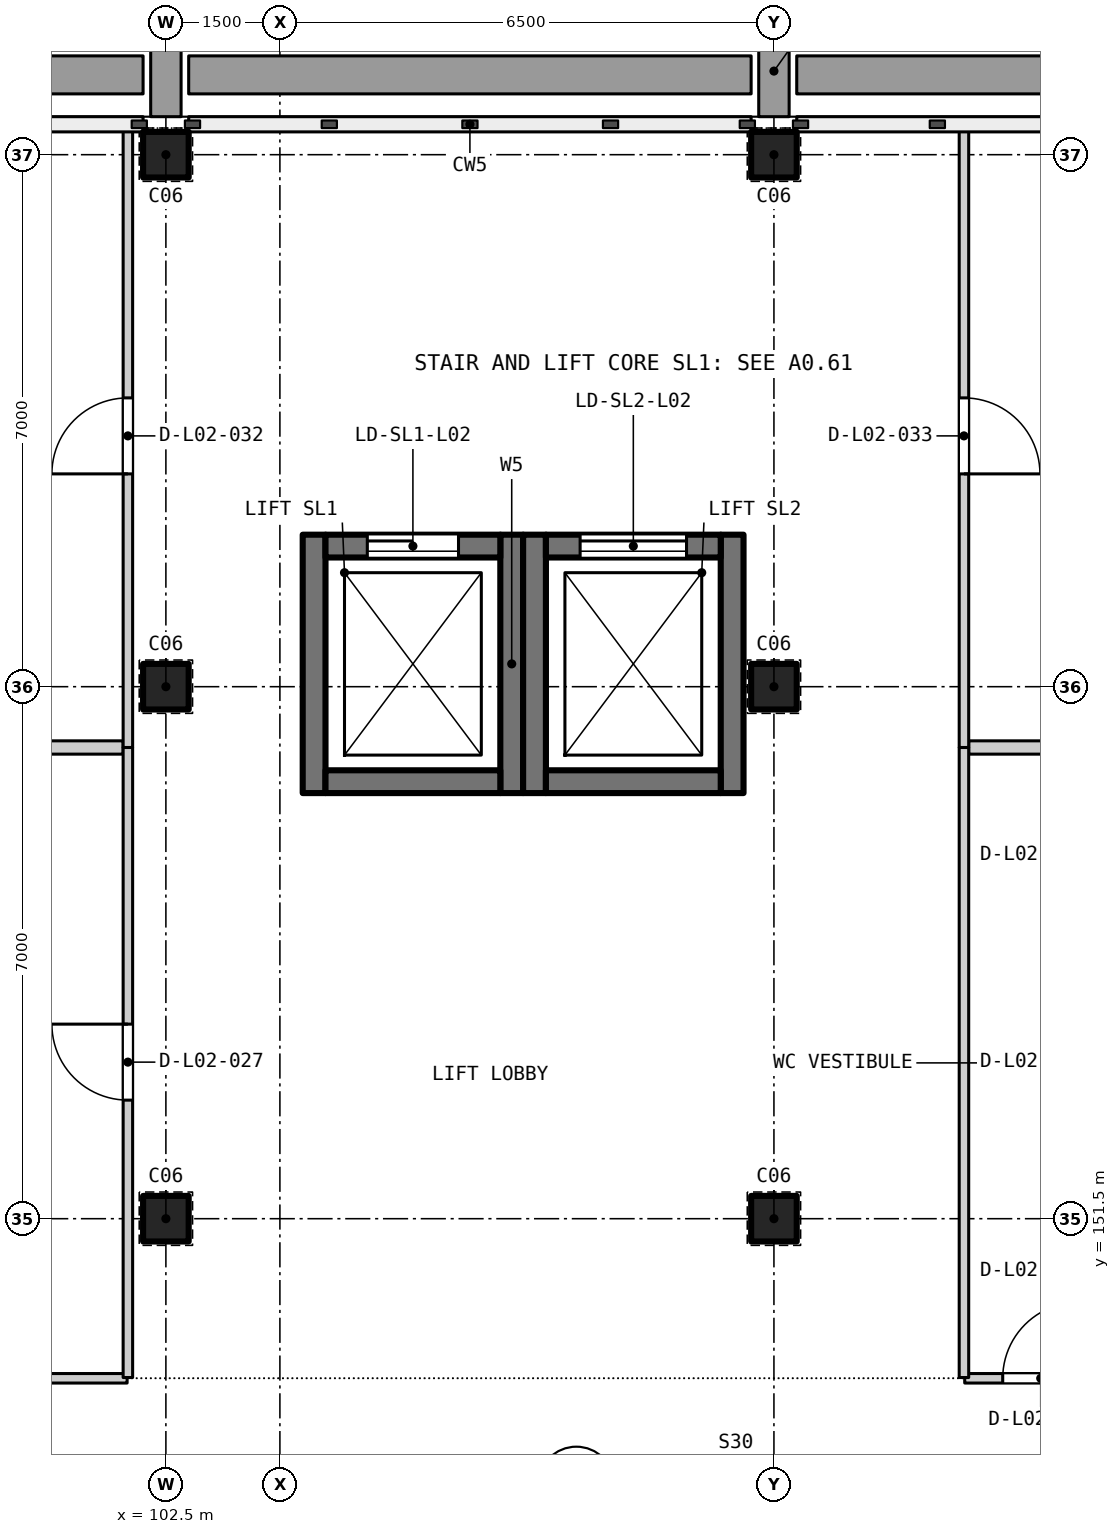
"""IFC4 building model, lengths in metres.
Left out: names, types, materials, properties, quantities, classifications, styles, units other than length and angle.
Written with IfcOpenShell. Run it as: python <this file> out.ifc"""

import sys

from ifc_helpers import new_model, si_unit, direction, frame, frame_2d, origin, origin_2d, place, context, subcontext, project, spatial, rectangle, extrude, element, fill, save


model = new_model("IFC4")
c1 = context("Model", 3, precision=1e-05, world=origin(), true_north=direction((0.0, 1.0)))
c2 = subcontext(c1, "Body", "Model", "MODEL_VIEW")
j1 = project(units=[si_unit("LENGTHUNIT", "METRE"), si_unit("PLANEANGLEUNIT", "RADIAN")], contexts=[c1])
p1 = place(None, origin())
s1 = spatial("IfcSite", under=j1, at=p1, CompositionType="ELEMENT")
p2 = place(p1, origin())
s2 = spatial("IfcBuilding", under=s1, at=p2, CompositionType="ELEMENT")
p3 = place(p2, frame((0.0, 0.0, 10.2)))
s3 = spatial("IfcBuildingStorey", under=s2, at=p3, CompositionType="ELEMENT", Elevation=10.2)
for number, where, z_axis, x_axis in (
    (1, (102.5, 151.5, 0.0), (0.0, 0.0, 1.0), (1.0, 0.0, 0.0)),
    (2, (102.5, 158.5, 0.0), (0.0, 0.0, 1.0), (1.0, 0.0, 0.0)),
    (3, (102.5, 165.5, 0.0), (0.0, 0.0, 1.0), (1.0, 0.0, 0.0)),
    (4, (110.5, 151.5, 0.0), (0.0, 0.0, 1.0), (1.0, 0.0, 0.0)),
    (5, (110.5, 158.5, 0.0), (0.0, 0.0, 1.0), (1.0, 0.0, 0.0)),
    (6, (110.5, 165.5, 0.0), (0.0, 0.0, 1.0), (1.0, 0.0, 0.0)),
):
    element("IfcColumn", number, at=place(p3, frame(where, z_axis=z_axis, x_axis=x_axis)), inside=s3, PredefinedType="COLUMN", context=c2, shape_type="SweptSolid", body=[
        extrude(rectangle(XDim=0.6, YDim=0.6, at=origin_2d()), origin(), (0.0, 0.0, 1.0), 4.2),
    ])
for number, where, z_axis, x_axis in (
    (7, (104.45, 157.1, 0.0), (0.0, 0.0, 1.0), (0.0, 1.0, 0.0)),
    (8, (107.05, 157.1, 0.0), (0.0, 0.0, 1.0), (0.0, 1.0, 0.0)),
):
    element("IfcWall", number, at=place(p3, frame(where, z_axis=z_axis, x_axis=x_axis)), inside=s3, PredefinedType="SHEAR", context=c2, shape_type="SweptSolid", body=[
        extrude(rectangle(XDim=3.4, YDim=0.3, at=frame_2d((1.7, 0.0))), origin(), (0.0, 0.0, 1.0), 4.2),
    ])
p4 = place(p3, frame((104.6, 157.25, 0.0), z_axis=(0.0, 0.0, 1.0), x_axis=(1.0, 0.0, 0.0)))
e9 = element("IfcWall", 9, at=p4, inside=s3, PredefinedType="SHEAR", context=c2, shape_type="SweptSolid", body=[
    extrude(rectangle(XDim=2.3, YDim=0.3, at=frame_2d((1.15, 0.0))), origin(), (0.0, 0.0, 1.0), 4.2),
])
p5 = place(p3, frame((104.6, 160.35, 0.0), z_axis=(0.0, 0.0, 1.0), x_axis=(1.0, 0.0, 0.0)))
e10 = element("IfcWall", 10, at=p5, inside=s3, PredefinedType="SHEAR", context=c2, shape_type="SweptSolid", body=[
    extrude(rectangle(XDim=2.3, YDim=0.3, at=frame_2d((1.15, 0.0))), origin(), (0.0, 0.0, 1.0), 4.2),
])
p6 = place(p5, frame((0.55, 0.0, 0.0)))
e11 = element("IfcOpeningElement", 11, at=p6, cuts=e10, PredefinedType="OPENING", context=c2, shape_type="SweptSolid", body=[
    extrude(rectangle(XDim=1.2, YDim=2.1, at=frame_2d((0.6, 1.05))), frame((0.0, 0.16, 0.0), z_axis=(0.0, -1.0, 0.0), x_axis=(1.0, 0.0, 0.0)), (0.0, 0.0, 1.0), 0.32),
])
for number, where, z_axis, x_axis in (
    (12, (107.35, 157.1, 0.0), (0.0, 0.0, 1.0), (0.0, 1.0, 0.0)),
    (13, (109.95, 157.1, 0.0), (0.0, 0.0, 1.0), (0.0, 1.0, 0.0)),
):
    element("IfcWall", number, at=place(p3, frame(where, z_axis=z_axis, x_axis=x_axis)), inside=s3, PredefinedType="SHEAR", context=c2, shape_type="SweptSolid", body=[
        extrude(rectangle(XDim=3.4, YDim=0.3, at=frame_2d((1.7, 0.0))), origin(), (0.0, 0.0, 1.0), 4.2),
    ])
p7 = place(p3, frame((107.5, 157.25, 0.0), z_axis=(0.0, 0.0, 1.0), x_axis=(1.0, 0.0, 0.0)))
e14 = element("IfcWall", 14, at=p7, inside=s3, PredefinedType="SHEAR", context=c2, shape_type="SweptSolid", body=[
    extrude(rectangle(XDim=2.3, YDim=0.3, at=frame_2d((1.15, 0.0))), origin(), (0.0, 0.0, 1.0), 4.2),
])
p8 = place(p3, frame((107.5, 160.35, 0.0), z_axis=(0.0, 0.0, 1.0), x_axis=(1.0, 0.0, 0.0)))
e15 = element("IfcWall", 15, at=p8, inside=s3, PredefinedType="SHEAR", context=c2, shape_type="SweptSolid", body=[
    extrude(rectangle(XDim=2.3, YDim=0.3, at=frame_2d((1.15, 0.0))), origin(), (0.0, 0.0, 1.0), 4.2),
])
p9 = place(p8, frame((0.45, 0.0, 0.0)))
e16 = element("IfcOpeningElement", 16, at=p9, cuts=e15, PredefinedType="OPENING", context=c2, shape_type="SweptSolid", body=[
    extrude(rectangle(XDim=1.4, YDim=2.1, at=frame_2d((0.7, 1.05))), frame((0.0, 0.16, 0.0), z_axis=(0.0, -1.0, 0.0), x_axis=(1.0, 0.0, 0.0)), (0.0, 0.0, 1.0), 0.32),
])
p10 = place(p3, frame((89.61, 149.4, 0.0), z_axis=(0.0, 0.0, 1.0), x_axis=(1.0, 0.0, 0.0)))
e17 = element("IfcWall", 17, at=p10, inside=s3, PredefinedType="PARTITIONING", context=c2, shape_type="SweptSolid", body=[
    extrude(rectangle(XDim=12.38, YDim=0.125, at=frame_2d((6.19, 0.0))), origin(), (0.0, 0.0, 1.0), 3.9),
])
p11 = place(p10, frame((5.7, 0.0, 0.0)))
e18 = element("IfcOpeningElement", 18, at=p11, cuts=e17, PredefinedType="OPENING", context=c2, shape_type="SweptSolid", body=[
    extrude(rectangle(XDim=1.0, YDim=2.1, at=frame_2d((0.5, 1.05))), frame((0.0, 0.073, 0.0), z_axis=(0.0, -1.0, 0.0), x_axis=(1.0, 0.0, 0.0)), (0.0, 0.0, 1.0), 0.145),
])
p12 = place(p3, frame((113.01, 149.4, 0.0), z_axis=(0.0, 0.0, 1.0), x_axis=(1.0, 0.0, 0.0)))
e19 = element("IfcWall", 19, at=p12, inside=s3, PredefinedType="PARTITIONING", context=c2, shape_type="SweptSolid", body=[
    extrude(rectangle(XDim=1.99, YDim=0.125, at=frame_2d((0.995, 0.0))), origin(), (0.0, 0.0, 1.0), 3.9),
])
p13 = place(p12, frame((0.5, 0.0, 0.0)))
e20 = element("IfcOpeningElement", 20, at=p13, cuts=e19, PredefinedType="OPENING", context=c2, shape_type="SweptSolid", body=[
    extrude(rectangle(XDim=1.0, YDim=2.1, at=frame_2d((0.5, 1.05))), frame((0.0, 0.073, 0.0), z_axis=(0.0, -1.0, 0.0), x_axis=(1.0, 0.0, 0.0)), (0.0, 0.0, 1.0), 0.145),
])
p14 = place(p3, frame((89.663, 157.7, 0.0), z_axis=(0.0, 0.0, 1.0), x_axis=(1.0, 0.0, 0.0)))
e21 = element("IfcWall", 21, at=p14, inside=s3, PredefinedType="PARTITIONING", context=c2, shape_type="SweptSolid", body=[
    extrude(rectangle(XDim=12.275, YDim=0.175, at=frame_2d((6.137, 0.0))), origin(), (0.0, 0.0, 1.0), 3.9),
])
p15 = place(p14, frame((0.1, 0.0, 0.0)))
e22 = element("IfcOpeningElement", 22, at=p15, cuts=e21, PredefinedType="OPENING", context=c2, shape_type="SweptSolid", body=[
    extrude(rectangle(XDim=1.0, YDim=2.1, at=frame_2d((0.5, 1.05))), frame((0.0, 0.097, 0.0), z_axis=(0.0, -1.0, 0.0), x_axis=(1.0, 0.0, 0.0)), (0.0, 0.0, 1.0), 0.195),
])
p16 = place(p3, frame((113.062, 157.7, 0.0), z_axis=(0.0, 0.0, 1.0), x_axis=(1.0, 0.0, 0.0)))
e23 = element("IfcWall", 23, at=p16, inside=s3, PredefinedType="PARTITIONING", context=c2, shape_type="SweptSolid", body=[
    extrude(rectangle(XDim=1.938, YDim=0.175, at=frame_2d((0.969, 0.0))), origin(), (0.0, 0.0, 1.0), 3.9),
])
p17 = place(p3, frame((102.0, 149.41, 0.0), z_axis=(0.0, 0.0, 1.0), x_axis=(0.0, 1.0, 0.0)))
e24 = element("IfcWall", 24, at=p17, inside=s3, PredefinedType="PARTITIONING", context=c2, shape_type="SweptSolid", body=[
    extrude(rectangle(XDim=8.29, YDim=0.125, at=frame_2d((4.145, 0.0))), origin(), (0.0, 0.0, 1.0), 3.9),
])
p18 = place(p17, frame((3.65, 0.0, 0.0)))
e25 = element("IfcOpeningElement", 25, at=p18, cuts=e24, PredefinedType="OPENING", context=c2, shape_type="SweptSolid", body=[
    extrude(rectangle(XDim=1.0, YDim=2.1, at=frame_2d((0.5, 1.05))), frame((0.0, 0.073, 0.0), z_axis=(0.0, -1.0, 0.0), x_axis=(1.0, 0.0, 0.0)), (0.0, 0.0, 1.0), 0.145),
])
p19 = place(p3, frame((102.0, 157.7, 0.0), z_axis=(0.0, 0.0, 1.0), x_axis=(0.0, 1.0, 0.0)))
e26 = element("IfcWall", 26, at=p19, inside=s3, PredefinedType="PARTITIONING", context=c2, shape_type="SweptSolid", body=[
    extrude(rectangle(XDim=8.15, YDim=0.125, at=frame_2d((4.075, 0.0))), origin(), (0.0, 0.0, 1.0), 3.9),
])
p20 = place(p19, frame((3.6, 0.0, 0.0)))
e27 = element("IfcOpeningElement", 27, at=p20, cuts=e26, PredefinedType="OPENING", context=c2, shape_type="SweptSolid", body=[
    extrude(rectangle(XDim=1.0, YDim=2.1, at=frame_2d((0.5, 1.05))), frame((0.0, 0.073, 0.0), z_axis=(0.0, -1.0, 0.0), x_axis=(1.0, 0.0, 0.0)), (0.0, 0.0, 1.0), 0.145),
])
p21 = place(p3, frame((113.0, 149.41, 0.0), z_axis=(0.0, 0.0, 1.0), x_axis=(0.0, 1.0, 0.0)))
e28 = element("IfcWall", 28, at=p21, inside=s3, PredefinedType="PARTITIONING", context=c2, shape_type="SweptSolid", body=[
    extrude(rectangle(XDim=8.29, YDim=0.125, at=frame_2d((4.145, 0.0))), origin(), (0.0, 0.0, 1.0), 3.9),
])
p22 = place(p3, frame((113.0, 157.7, 0.0), z_axis=(0.0, 0.0, 1.0), x_axis=(0.0, 1.0, 0.0)))
e29 = element("IfcWall", 29, at=p22, inside=s3, PredefinedType="PARTITIONING", context=c2, shape_type="SweptSolid", body=[
    extrude(rectangle(XDim=8.15, YDim=0.125, at=frame_2d((4.075, 0.0))), origin(), (0.0, 0.0, 1.0), 3.9),
])
p23 = place(p22, frame((3.6, 0.0, 0.0)))
e30 = element("IfcOpeningElement", 30, at=p23, cuts=e29, PredefinedType="OPENING", context=c2, shape_type="SweptSolid", body=[
    extrude(rectangle(XDim=1.0, YDim=2.1, at=frame_2d((0.5, 1.05))), frame((0.0, 0.073, 0.0), z_axis=(0.0, -1.0, 0.0), x_axis=(1.0, 0.0, 0.0)), (0.0, 0.0, 1.0), 0.145),
])
p24 = place(p13, origin())
e31 = element("IfcDoor", 31, at=p24, inside=s3, OperationType="SINGLE_SWING_RIGHT", PredefinedType="DOOR", context=c2, shape_type="SweptSolid", body=[
    extrude(rectangle(XDim=1.0, YDim=2.1, at=frame_2d((0.5, 1.05))), frame((0.0, 0.025, 0.0), z_axis=(0.0, -1.0, 0.0), x_axis=(1.0, 0.0, 0.0)), (0.0, 0.0, 1.0), 0.05),
])
fill(e20, e31)
p25 = place(p18, origin())
e32 = element("IfcDoor", 32, at=p25, inside=s3, OperationType="SINGLE_SWING_RIGHT", PredefinedType="DOOR", context=c2, shape_type="SweptSolid", body=[
    extrude(rectangle(XDim=1.0, YDim=2.1, at=frame_2d((0.5, 1.05))), frame((0.0, 0.025, 0.0), z_axis=(0.0, -1.0, 0.0), x_axis=(1.0, 0.0, 0.0)), (0.0, 0.0, 1.0), 0.05),
])
fill(e25, e32)
p26 = place(p20, origin())
e33 = element("IfcDoor", 33, at=p26, inside=s3, OperationType="SINGLE_SWING_LEFT", PredefinedType="DOOR", context=c2, shape_type="SweptSolid", body=[
    extrude(rectangle(XDim=1.0, YDim=2.1, at=frame_2d((0.5, 1.05))), frame((0.0, 0.025, 0.0), z_axis=(0.0, -1.0, 0.0), x_axis=(1.0, 0.0, 0.0)), (0.0, 0.0, 1.0), 0.05),
])
fill(e27, e33)
p27 = place(p23, frame((1.0, 0.0, 0.0), z_axis=(0.0, 0.0, 1.0), x_axis=(-1.0, 0.0, 0.0)))
e34 = element("IfcDoor", 34, at=p27, inside=s3, OperationType="SINGLE_SWING_RIGHT", PredefinedType="DOOR", context=c2, shape_type="SweptSolid", body=[
    extrude(rectangle(XDim=1.0, YDim=2.1, at=frame_2d((0.5, 1.05))), frame((0.0, 0.025, 0.0), z_axis=(0.0, -1.0, 0.0), x_axis=(1.0, 0.0, 0.0)), (0.0, 0.0, 1.0), 0.05),
])
fill(e30, e34)
p28 = place(p6, origin())
e35 = element("IfcDoor", 35, at=p28, inside=s3, OperationType="SLIDING_TO_LEFT", PredefinedType="DOOR", context=c2, shape_type="SweptSolid", body=[
    extrude(rectangle(XDim=1.2, YDim=2.1, at=frame_2d((0.6, 1.05))), frame((0.0, 0.025, 0.0), z_axis=(0.0, -1.0, 0.0), x_axis=(1.0, 0.0, 0.0)), (0.0, 0.0, 1.0), 0.05),
])
fill(e11, e35)
p29 = place(p9, origin())
e36 = element("IfcDoor", 36, at=p29, inside=s3, OperationType="DOUBLE_DOOR_SLIDING", PredefinedType="DOOR", context=c2, shape_type="SweptSolid", body=[
    extrude(rectangle(XDim=1.4, YDim=2.1, at=frame_2d((0.7, 1.05))), frame((0.0, 0.025, 0.0), z_axis=(0.0, -1.0, 0.0), x_axis=(1.0, 0.0, 0.0)), (0.0, 0.0, 1.0), 0.05),
])
fill(e16, e36)
save(model, sys.argv[1])
